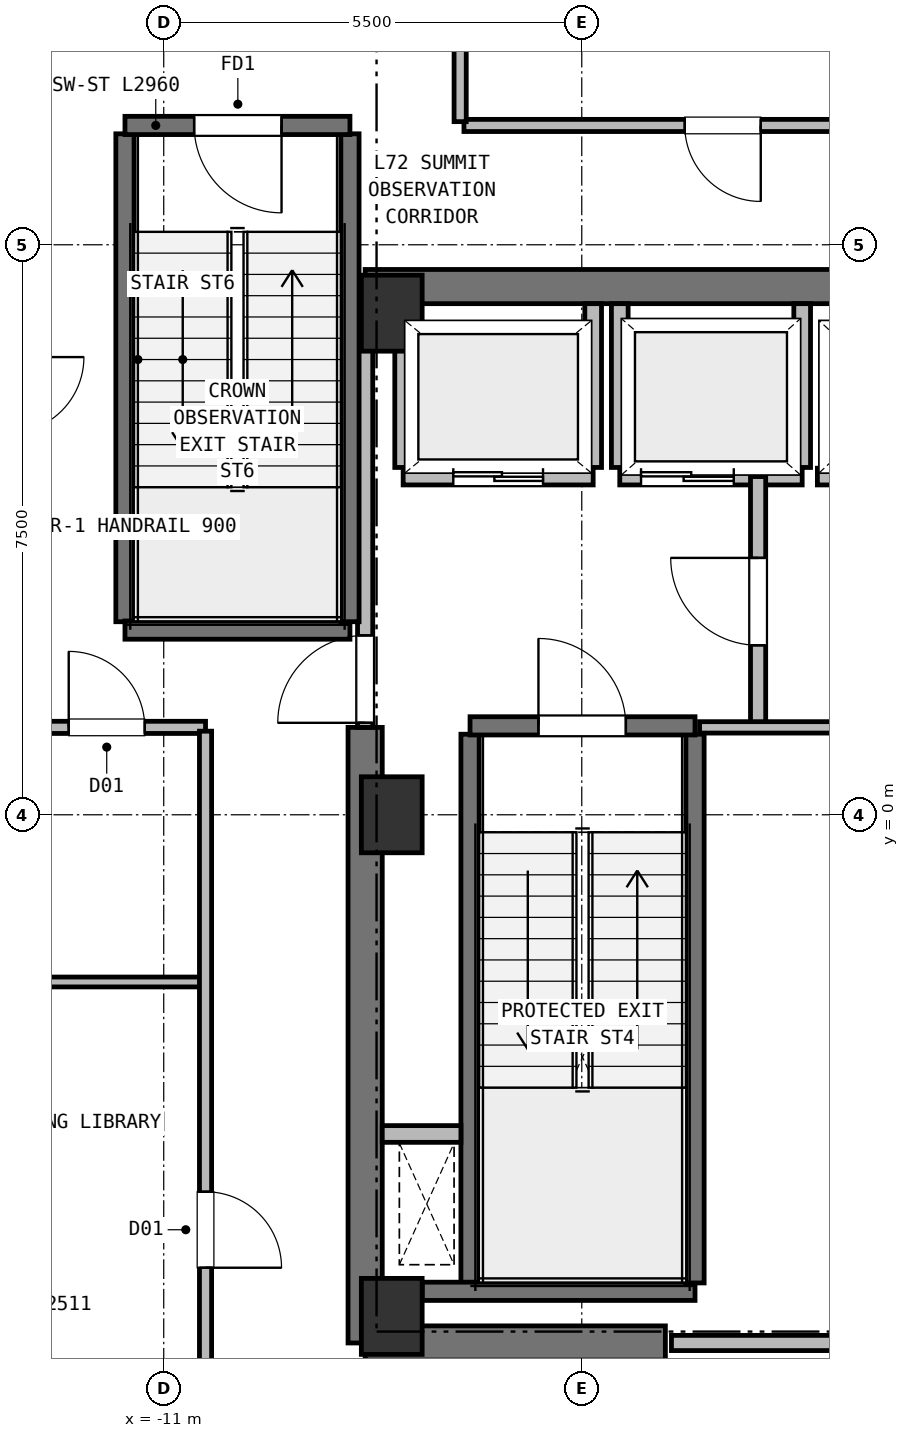
"""IFC4 building model, lengths in metres.
Left out: names, types, materials, properties, quantities, classifications, styles, units other than length and angle.
Written with IfcOpenShell. Run it as: python <this file> out.ifc"""

import sys

from ifc_helpers import new_model, si_unit, direction, frame, frame_2d, origin, origin_2d, place, context, subcontext, project, spatial, rectangle, extrude, element, fill, save


model = new_model("IFC4")
c1 = context("Model", 3, precision=1e-05, world=origin(), true_north=direction((0.0, 1.0)))
c2 = subcontext(c1, "Body", "Model", "MODEL_VIEW")
j1 = project(units=[si_unit("LENGTHUNIT", "METRE"), si_unit("PLANEANGLEUNIT", "RADIAN")], contexts=[c1])
p1 = place(None, origin())
s1 = spatial("IfcSite", under=j1, at=p1, CompositionType="ELEMENT")
p2 = place(p1, origin())
s2 = spatial("IfcBuilding", under=s1, at=p2, CompositionType="ELEMENT")
p3 = place(p2, frame((0.0, 0.0, 290.4)))
s3 = spatial("IfcBuildingStorey", under=s2, at=p3, CompositionType="ELEMENT", Elevation=290.4)
for number, where, z_axis, x_axis in (
    (1, (-8.0, -6.6, 0.0), (0.0, 0.0, 1.0), (1.0, 0.0, 0.0)),
    (2, (-8.0, 6.6, 0.0), (0.0, 0.0, 1.0), (1.0, 0.0, 0.0)),
    (3, (-8.0, 0.0, 0.0), (0.0, 0.0, 1.0), (1.0, 0.0, 0.0)),
):
    element("IfcColumn", number, at=place(p3, frame(where, z_axis=z_axis, x_axis=x_axis)), inside=s3, PredefinedType="COLUMN", context=c2, shape_type="SweptSolid", body=[
        extrude(rectangle(XDim=0.8, YDim=1.0, at=origin_2d()), origin(), (0.0, 0.0, 1.0), 4.4),
    ])
p4 = place(p3, frame((-8.35, 6.95, 0.0), z_axis=(0.0, 0.0, 1.0), x_axis=(1.0, 0.0, 0.0)))
e4 = element("IfcWall", 4, at=p4, inside=s3, PredefinedType="SHEAR", context=c2, shape_type="SweptSolid", body=[
    extrude(rectangle(XDim=16.7, YDim=0.45, at=frame_2d((8.35, 0.0))), origin(), (0.0, 0.0, 1.0), 4.13),
])
p5 = place(p3, frame((-8.35, -6.95, 0.0), z_axis=(0.0, 0.0, 1.0), x_axis=(1.0, 0.0, 0.0)))
e5 = element("IfcWall", 5, at=p5, inside=s3, PredefinedType="SHEAR", context=c2, shape_type="SweptSolid", body=[
    extrude(rectangle(XDim=3.95, YDim=0.45, at=frame_2d((1.975, 0.0))), origin(), (0.0, 0.0, 1.0), 4.13),
])
p6 = place(p3, frame((-8.35, -6.95, 0.0), z_axis=(0.0, 0.0, 1.0), x_axis=(0.0, 1.0, 0.0)))
e6 = element("IfcWall", 6, at=p6, inside=s3, PredefinedType="SHEAR", context=c2, shape_type="SweptSolid", body=[
    extrude(rectangle(XDim=8.1, YDim=0.45, at=frame_2d((4.05, 0.0))), origin(), (0.0, 0.0, 1.0), 4.13),
])
p7 = place(p3, frame((-13.944, 9.485, 0.0), z_axis=(0.0, 0.0, 1.0), x_axis=(0.873960918974, 0.485996205856, 0.0)))
e7 = element("IfcWall", 7, at=p7, inside=s3, PredefinedType="SOLIDWALL", context=c2, shape_type="SweptSolid", body=[
    extrude(rectangle(XDim=2.523, YDim=0.33, at=frame_2d((1.261, 0.0))), origin(), (0.0, 0.0, 1.0), 4.13),
])
p8 = place(p3, frame((-6.97, -6.16, 0.0), z_axis=(0.0, 0.0, 1.0), x_axis=(0.0, 1.0, 0.0)))
e8 = element("IfcWall", 8, at=p8, inside=s3, PredefinedType="SHEAR", context=c2, shape_type="SweptSolid", body=[
    extrude(rectangle(XDim=7.22, YDim=0.24, at=frame_2d((3.61, 0.0))), origin(), (0.0, 0.0, 1.0), 4.13),
])
p9 = place(p3, frame((-7.6, -6.27, 0.0), z_axis=(0.0, 0.0, 1.0), x_axis=(1.0, 0.0, 0.0)))
e9 = element("IfcWall", 9, at=p9, inside=s3, PredefinedType="SHEAR", context=c2, shape_type="SweptSolid", body=[
    extrude(rectangle(XDim=3.59, YDim=0.24, at=frame_2d((1.795, 0.0))), origin(), (0.0, 0.0, 1.0), 4.13),
])
p10 = place(p3, frame((-4.01, -6.16, 0.0), z_axis=(0.0, 0.0, 1.0), x_axis=(0.0, 1.0, 0.0)))
e10 = element("IfcWall", 10, at=p10, inside=s3, PredefinedType="SHEAR", context=c2, shape_type="SweptSolid", body=[
    extrude(rectangle(XDim=7.22, YDim=0.24, at=frame_2d((3.61, 0.0))), origin(), (0.0, 0.0, 1.0), 4.13),
])
p11 = place(p3, frame((-6.97, 1.17, 0.0), z_axis=(0.0, 0.0, 1.0), x_axis=(1.0, 0.0, 0.0)))
e11 = element("IfcWall", 11, at=p11, inside=s3, PredefinedType="SHEAR", context=c2, shape_type="SweptSolid", body=[
    extrude(rectangle(XDim=2.96, YDim=0.24, at=frame_2d((1.48, 0.0))), origin(), (0.0, 0.0, 1.0), 4.13),
])
p12 = place(p11, frame((0.9, 0.0, 0.0)))
e12 = element("IfcOpeningElement", 12, at=p12, cuts=e11, PredefinedType="OPENING", context=c2, shape_type="SweptSolid", body=[
    extrude(rectangle(XDim=1.15, YDim=2.15, at=frame_2d((0.575, 1.075))), frame((0.0, 0.13, 0.0), z_axis=(0.0, -1.0, 0.0), x_axis=(1.0, 0.0, 0.0)), (0.0, 0.0, 1.0), 0.26),
])
p13 = place(p3, frame((-8.125, -4.2, 0.0), z_axis=(0.0, 0.0, 1.0), x_axis=(1.0, 0.0, 0.0)))
e13 = element("IfcWall", 13, at=p13, inside=s3, PredefinedType="PARTITIONING", context=c2, shape_type="SweptSolid", body=[
    extrude(rectangle(XDim=1.035, YDim=0.22, at=frame_2d((0.518, 0.0))), origin(), (0.0, 0.0, 1.0), 4.13),
])
p14 = place(p3, frame((-7.85, 4.45, 0.0), z_axis=(0.0, 0.0, 1.0), x_axis=(1.0, 0.0, 0.0)))
e14 = element("IfcWall", 14, at=p14, inside=s3, PredefinedType="PARTITIONING", context=c2, shape_type="SweptSolid", body=[
    extrude(rectangle(XDim=2.5, YDim=0.22, at=frame_2d((1.25, 0.0))), origin(), (0.0, 0.0, 1.0), 4.13),
])
p15 = place(p14, frame((0.66, 0.0, 0.0)))
e15 = element("IfcOpeningElement", 15, at=p15, cuts=e14, PredefinedType="OPENING", context=c2, shape_type="SweptSolid", body=[
    extrude(rectangle(XDim=1.18, YDim=2.15, at=frame_2d((0.59, 1.075))), frame((0.0, 0.12, 0.0), z_axis=(0.0, -1.0, 0.0), x_axis=(1.0, 0.0, 0.0)), (0.0, 0.0, 1.0), 0.24),
])
p16 = place(p3, frame((-7.85, 4.57, 0.0), z_axis=(0.0, 0.0, 1.0), x_axis=(0.0, 1.0, 0.0)))
e16 = element("IfcWall", 16, at=p16, inside=s3, PredefinedType="PARTITIONING", context=c2, shape_type="SweptSolid", body=[
    extrude(rectangle(XDim=2.155, YDim=0.22, at=frame_2d((1.078, 0.0))), origin(), (0.0, 0.0, 1.0), 3.81),
])
p17 = place(p3, frame((-5.35, 4.57, 0.0), z_axis=(0.0, 0.0, 1.0), x_axis=(0.0, 1.0, 0.0)))
e17 = element("IfcWall", 17, at=p17, inside=s3, PredefinedType="PARTITIONING", context=c2, shape_type="SweptSolid", body=[
    extrude(rectangle(XDim=2.155, YDim=0.22, at=frame_2d((1.078, 0.0))), origin(), (0.0, 0.0, 1.0), 4.13),
])
p18 = place(p3, frame((-5.0, 4.45, 0.0), z_axis=(0.0, 0.0, 1.0), x_axis=(1.0, 0.0, 0.0)))
e18 = element("IfcWall", 18, at=p18, inside=s3, PredefinedType="PARTITIONING", context=c2, shape_type="SweptSolid", body=[
    extrude(rectangle(XDim=2.4, YDim=0.22, at=frame_2d((1.2, 0.0))), origin(), (0.0, 0.0, 1.0), 4.13),
])
p19 = place(p18, frame((0.28, 0.0, 0.0)))
e19 = element("IfcOpeningElement", 19, at=p19, cuts=e18, PredefinedType="OPENING", context=c2, shape_type="SweptSolid", body=[
    extrude(rectangle(XDim=1.22, YDim=2.15, at=frame_2d((0.61, 1.075))), frame((0.0, 0.12, 0.0), z_axis=(0.0, -1.0, 0.0), x_axis=(1.0, 0.0, 0.0)), (0.0, 0.0, 1.0), 0.24),
])
for number, where, z_axis, x_axis in (
    (20, (-5.0, 4.57, 0.0), (0.0, 0.0, 1.0), (0.0, 1.0, 0.0)),
    (21, (-2.6, 4.57, 0.0), (0.0, 0.0, 1.0), (0.0, 1.0, 0.0)),
):
    element("IfcWall", number, at=place(p3, frame(where, z_axis=z_axis, x_axis=x_axis)), inside=s3, PredefinedType="PARTITIONING", context=c2, shape_type="SweptSolid", body=[
        extrude(rectangle(XDim=2.155, YDim=0.22, at=frame_2d((1.078, 0.0))), origin(), (0.0, 0.0, 1.0), 4.13),
    ])
p20 = place(p3, frame((-2.4, 4.45, 0.0), z_axis=(0.0, 0.0, 1.0), x_axis=(1.0, 0.0, 0.0)))
e22 = element("IfcWall", 22, at=p20, inside=s3, PredefinedType="PARTITIONING", context=c2, shape_type="SweptSolid", body=[
    extrude(rectangle(XDim=2.2, YDim=0.22, at=frame_2d((1.1, 0.0))), origin(), (0.0, 0.0, 1.0), 4.13),
])
p21 = place(p20, frame((0.54, 0.0, 0.0)))
e23 = element("IfcOpeningElement", 23, at=p21, cuts=e22, PredefinedType="OPENING", context=c2, shape_type="SweptSolid", body=[
    extrude(rectangle(XDim=1.12, YDim=2.15, at=frame_2d((0.56, 1.075))), frame((0.0, 0.12, 0.0), z_axis=(0.0, -1.0, 0.0), x_axis=(1.0, 0.0, 0.0)), (0.0, 0.0, 1.0), 0.24),
])
p22 = place(p3, frame((-3.18, 1.15, 0.0), z_axis=(0.0, 0.0, 1.0), x_axis=(0.0, 1.0, 0.0)))
e24 = element("IfcWall", 24, at=p22, inside=s3, PredefinedType="PARTITIONING", context=c2, shape_type="SweptSolid", body=[
    extrude(rectangle(XDim=3.3, YDim=0.2, at=frame_2d((1.65, 0.0))), origin(), (0.0, 0.0, 1.0), 4.13),
])
p23 = place(p22, frame((1.08, 0.0, 0.0)))
e25 = element("IfcOpeningElement", 25, at=p23, cuts=e24, PredefinedType="OPENING", context=c2, shape_type="SweptSolid", body=[
    extrude(rectangle(XDim=1.15, YDim=2.15, at=frame_2d((0.575, 1.075))), frame((0.0, 0.11, 0.0), z_axis=(0.0, -1.0, 0.0), x_axis=(1.0, 0.0, 0.0)), (0.0, 0.0, 1.0), 0.22),
])
p24 = place(p3, frame((-8.35, 1.15, 0.0), z_axis=(0.0, 0.0, 1.0), x_axis=(0.0, 1.0, 0.0)))
e26 = element("IfcWall", 26, at=p24, inside=s3, PredefinedType="PARTITIONING", context=c2, shape_type="SweptSolid", body=[
    extrude(rectangle(XDim=5.4, YDim=0.2, at=frame_2d((2.7, 0.0))), origin(), (0.0, 0.0, 1.0), 4.13),
])
p25 = place(p24, frame((0.06, 0.0, 0.0)))
e27 = element("IfcOpeningElement", 27, at=p25, cuts=e26, PredefinedType="OPENING", context=c2, shape_type="SweptSolid", body=[
    extrude(rectangle(XDim=1.15, YDim=2.15, at=frame_2d((0.575, 1.075))), frame((0.0, 0.11, 0.0), z_axis=(0.0, -1.0, 0.0), x_axis=(1.0, 0.0, 0.0)), (0.0, 0.0, 1.0), 0.22),
])
p26 = place(p3, frame((3.95, 1.15, 0.0), z_axis=(0.0, 0.0, 1.0), x_axis=(-1.0, 0.0, 0.0)))
e28 = element("IfcWall", 28, at=p26, inside=s3, PredefinedType="PARTITIONING", context=c2, shape_type="SweptSolid", body=[
    extrude(rectangle(XDim=7.9, YDim=0.15, at=frame_2d((3.95, 0.0))), origin(), (0.0, 0.0, 1.0), 4.13),
])
p27 = place(p26, frame((3.49, 0.0, 0.0)))
e29 = element("IfcOpeningElement", 29, at=p27, cuts=e28, PredefinedType="OPENING", context=c2, shape_type="SweptSolid", body=[
    extrude(rectangle(XDim=0.92, YDim=2.05, at=frame_2d((0.46, 1.025))), frame((0.0, 0.085, 0.0), z_axis=(0.0, -1.0, 0.0), x_axis=(1.0, 0.0, 0.0)), (0.0, 0.0, 1.0), 0.17),
])
p28 = place(p3, frame((-4.32, -6.95, 0.0), z_axis=(0.0, 0.0, 1.0), x_axis=(1.0, 0.0, 0.0)))
e30 = element("IfcWall", 30, at=p28, inside=s3, PredefinedType="PARTITIONING", context=c2, shape_type="SweptSolid", body=[
    extrude(rectangle(XDim=8.64, YDim=0.2, at=frame_2d((4.32, 0.0))), origin(), (0.0, 0.0, 1.0), 4.13),
])
p29 = place(p3, frame((-11.51, 2.54, 0.0), z_axis=(0.0, 0.0, 1.0), x_axis=(0.0, 1.0, 0.0)))
e31 = element("IfcWall", 31, at=p29, inside=s3, PredefinedType="SHEAR", context=c2, shape_type="SweptSolid", body=[
    extrude(rectangle(XDim=6.42, YDim=0.24, at=frame_2d((3.21, 0.0))), origin(), (0.0, 0.0, 1.0), 4.13),
])
p30 = place(p3, frame((-11.51, 2.43, 0.0), z_axis=(0.0, 0.0, 1.0), x_axis=(1.0, 0.0, 0.0)))
e32 = element("IfcWall", 32, at=p30, inside=s3, PredefinedType="SHEAR", context=c2, shape_type="SweptSolid", body=[
    extrude(rectangle(XDim=2.96, YDim=0.24, at=frame_2d((1.48, 0.0))), origin(), (0.0, 0.0, 1.0), 4.13),
])
p31 = place(p3, frame((-8.55, 2.54, 0.0), z_axis=(0.0, 0.0, 1.0), x_axis=(0.0, 1.0, 0.0)))
e33 = element("IfcWall", 33, at=p31, inside=s3, PredefinedType="SHEAR", context=c2, shape_type="SweptSolid", body=[
    extrude(rectangle(XDim=6.42, YDim=0.24, at=frame_2d((3.21, 0.0))), origin(), (0.0, 0.0, 1.0), 4.13),
])
p32 = place(p3, frame((-8.55, 9.07, 0.0), z_axis=(0.0, 0.0, 1.0), x_axis=(-1.0, 0.0, 0.0)))
e34 = element("IfcWall", 34, at=p32, inside=s3, PredefinedType="SHEAR", context=c2, shape_type="SweptSolid", body=[
    extrude(rectangle(XDim=2.96, YDim=0.24, at=frame_2d((1.48, 0.0))), origin(), (0.0, 0.0, 1.0), 4.13),
])
p33 = place(p32, frame((0.9, 0.0, 0.0)))
e35 = element("IfcOpeningElement", 35, at=p33, cuts=e34, PredefinedType="OPENING", context=c2, shape_type="SweptSolid", body=[
    extrude(rectangle(XDim=1.15, YDim=2.15, at=frame_2d((0.575, 1.075))), frame((0.0, 0.13, 0.0), z_axis=(0.0, -1.0, 0.0), x_axis=(1.0, 0.0, 0.0)), (0.0, 0.0, 1.0), 0.26),
])
p34 = place(p3, frame((-18.261, -2.2, 0.0), z_axis=(0.0, 0.0, 1.0), x_axis=(1.0, 0.0, 0.0)))
e36 = element("IfcWall", 36, at=p34, inside=s3, PredefinedType="PARTITIONING", context=c2, shape_type="SweptSolid", body=[
    extrude(rectangle(XDim=7.861, YDim=0.13, at=frame_2d((3.931, 0.0))), origin(), (0.0, 0.0, 1.0), 4.13),
])
p35 = place(p3, frame((8.7, 9.07, 0.0), z_axis=(0.0, 0.0, 1.0), x_axis=(-1.0, 0.0, 0.0)))
e37 = element("IfcWall", 37, at=p35, inside=s3, PredefinedType="PARTITIONING", context=c2, shape_type="SweptSolid", body=[
    extrude(rectangle(XDim=15.75, YDim=0.16, at=frame_2d((7.875, 0.0))), origin(), (0.0, 0.0, 1.0), 4.13),
])
p36 = place(p35, frame((11.845, 0.0, 0.0)))
e38 = element("IfcOpeningElement", 38, at=p36, cuts=e37, PredefinedType="OPENING", context=c2, shape_type="SweptSolid", body=[
    extrude(rectangle(XDim=1.0, YDim=2.15, at=frame_2d((0.5, 1.075))), frame((0.0, 0.09, 0.0), z_axis=(0.0, -1.0, 0.0), x_axis=(1.0, 0.0, 0.0)), (0.0, 0.0, 1.0), 0.18),
])
p37 = place(p35, frame((4.23, 0.0, 0.0)))
e39 = element("IfcOpeningElement", 39, at=p37, cuts=e37, PredefinedType="OPENING", context=c2, shape_type="SweptSolid", body=[
    extrude(rectangle(XDim=1.0, YDim=2.15, at=frame_2d((0.5, 1.075))), frame((0.0, 0.09, 0.0), z_axis=(0.0, -1.0, 0.0), x_axis=(1.0, 0.0, 0.0)), (0.0, 0.0, 1.0), 0.18),
])
p38 = place(p3, frame((-7.1, 9.12, 0.0), z_axis=(0.0, 0.0, 1.0), x_axis=(0.0, 1.0, 0.0)))
e40 = element("IfcWall", 40, at=p38, inside=s3, PredefinedType="PARTITIONING", context=c2, shape_type="SweptSolid", body=[
    extrude(rectangle(XDim=1.38, YDim=0.16, at=frame_2d((0.69, 0.0))), origin(), (0.0, 0.0, 1.0), 4.13),
])
p39 = place(p3, frame((-13.05, 1.15, 0.0), z_axis=(0.0, 0.0, 1.0), x_axis=(1.0, 0.0, 0.0)))
e41 = element("IfcWall", 41, at=p39, inside=s3, PredefinedType="PARTITIONING", context=c2, shape_type="SweptSolid", body=[
    extrude(rectangle(XDim=2.6, YDim=0.16, at=frame_2d((1.3, 0.0))), origin(), (0.0, 0.0, 1.0), 3.71),
])
p40 = place(p39, frame((0.8, 0.0, 0.0)))
e42 = element("IfcOpeningElement", 42, at=p40, cuts=e41, PredefinedType="OPENING", context=c2, shape_type="SweptSolid", body=[
    extrude(rectangle(XDim=1.0, YDim=2.15, at=frame_2d((0.5, 1.075))), frame((0.0, 0.09, 0.0), z_axis=(0.0, -1.0, 0.0), x_axis=(1.0, 0.0, 0.0)), (0.0, 0.0, 1.0), 0.18),
])
p41 = place(p3, frame((-10.45, 1.1, 0.0), z_axis=(0.0, 0.0, 1.0), x_axis=(0.0, -1.0, 0.0)))
e43 = element("IfcWall", 43, at=p41, inside=s3, PredefinedType="PARTITIONING", context=c2, shape_type="SweptSolid", body=[
    extrude(rectangle(XDim=10.08, YDim=0.16, at=frame_2d((5.04, 0.0))), origin(), (0.0, 0.0, 1.0), 4.13),
])
p42 = place(p41, frame((6.06, 0.0, 0.0)))
e44 = element("IfcOpeningElement", 44, at=p42, cuts=e43, PredefinedType="OPENING", context=c2, shape_type="SweptSolid", body=[
    extrude(rectangle(XDim=1.0, YDim=2.15, at=frame_2d((0.5, 1.075))), frame((0.0, 0.09, 0.0), z_axis=(0.0, -1.0, 0.0), x_axis=(1.0, 0.0, 0.0)), (0.0, 0.0, 1.0), 0.18),
])
p43 = place(p12, origin())
e45 = element("IfcDoor", 45, at=p43, inside=s3, OperationType="SINGLE_SWING_LEFT", PredefinedType="DOOR", context=c2, shape_type="SweptSolid", body=[
    extrude(rectangle(XDim=1.15, YDim=2.15, at=frame_2d((0.575, 1.075))), frame((0.0, 0.025, 0.0), z_axis=(0.0, -1.0, 0.0), x_axis=(1.0, 0.0, 0.0)), (0.0, 0.0, 1.0), 0.05),
])
fill(e12, e45)
p44 = place(p15, origin())
e46 = element("IfcDoor", 46, at=p44, inside=s3, OperationType="DOUBLE_DOOR_SLIDING", PredefinedType="DOOR", context=c2, shape_type="SweptSolid", body=[
    extrude(rectangle(XDim=1.18, YDim=2.15, at=frame_2d((0.59, 1.075))), frame((0.0, 0.025, 0.0), z_axis=(0.0, -1.0, 0.0), x_axis=(1.0, 0.0, 0.0)), (0.0, 0.0, 1.0), 0.05),
])
fill(e15, e46)
p45 = place(p19, origin())
e47 = element("IfcDoor", 47, at=p45, inside=s3, OperationType="DOUBLE_DOOR_SLIDING", PredefinedType="DOOR", context=c2, shape_type="SweptSolid", body=[
    extrude(rectangle(XDim=1.22, YDim=2.15, at=frame_2d((0.61, 1.075))), frame((0.0, 0.025, 0.0), z_axis=(0.0, -1.0, 0.0), x_axis=(1.0, 0.0, 0.0)), (0.0, 0.0, 1.0), 0.05),
])
fill(e19, e47)
p46 = place(p23, origin())
e48 = element("IfcDoor", 48, at=p46, inside=s3, OperationType="SINGLE_SWING_RIGHT", PredefinedType="DOOR", context=c2, shape_type="SweptSolid", body=[
    extrude(rectangle(XDim=1.15, YDim=2.15, at=frame_2d((0.575, 1.075))), frame((0.0, 0.025, 0.0), z_axis=(0.0, -1.0, 0.0), x_axis=(1.0, 0.0, 0.0)), (0.0, 0.0, 1.0), 0.05),
])
fill(e25, e48)
p47 = place(p25, origin())
e49 = element("IfcDoor", 49, at=p47, inside=s3, OperationType="SINGLE_SWING_LEFT", PredefinedType="DOOR", context=c2, shape_type="SweptSolid", body=[
    extrude(rectangle(XDim=1.15, YDim=2.15, at=frame_2d((0.575, 1.075))), frame((0.0, 0.025, 0.0), z_axis=(0.0, -1.0, 0.0), x_axis=(1.0, 0.0, 0.0)), (0.0, 0.0, 1.0), 0.05),
])
fill(e27, e49)
p48 = place(p33, origin())
e50 = element("IfcDoor", 50, at=p48, inside=s3, OperationType="SINGLE_SWING_LEFT", PredefinedType="DOOR", context=c2, shape_type="SweptSolid", body=[
    extrude(rectangle(XDim=1.15, YDim=2.15, at=frame_2d((0.575, 1.075))), frame((0.0, 0.025, 0.0), z_axis=(0.0, -1.0, 0.0), x_axis=(1.0, 0.0, 0.0)), (0.0, 0.0, 1.0), 0.05),
])
fill(e35, e50)
p49 = place(p36, origin())
e51 = element("IfcDoor", 51, at=p49, inside=s3, OperationType="SINGLE_SWING_LEFT", PredefinedType="DOOR", context=c2, shape_type="SweptSolid", body=[
    extrude(rectangle(XDim=1.0, YDim=2.15, at=frame_2d((0.5, 1.075))), frame((0.0, 0.025, 0.0), z_axis=(0.0, -1.0, 0.0), x_axis=(1.0, 0.0, 0.0)), (0.0, 0.0, 1.0), 0.05),
])
fill(e38, e51)
p50 = place(p40, origin())
e52 = element("IfcDoor", 52, at=p50, inside=s3, OperationType="SINGLE_SWING_LEFT", PredefinedType="DOOR", context=c2, shape_type="SweptSolid", body=[
    extrude(rectangle(XDim=1.0, YDim=2.15, at=frame_2d((0.5, 1.075))), frame((0.0, 0.025, 0.0), z_axis=(0.0, -1.0, 0.0), x_axis=(1.0, 0.0, 0.0)), (0.0, 0.0, 1.0), 0.05),
])
fill(e42, e52)
p51 = place(p42, origin())
e53 = element("IfcDoor", 53, at=p51, inside=s3, OperationType="SINGLE_SWING_RIGHT", PredefinedType="DOOR", context=c2, shape_type="SweptSolid", body=[
    extrude(rectangle(XDim=1.0, YDim=2.15, at=frame_2d((0.5, 1.075))), frame((0.0, 0.025, 0.0), z_axis=(0.0, -1.0, 0.0), x_axis=(1.0, 0.0, 0.0)), (0.0, 0.0, 1.0), 0.05),
])
fill(e44, e53)
save(model, sys.argv[1])
